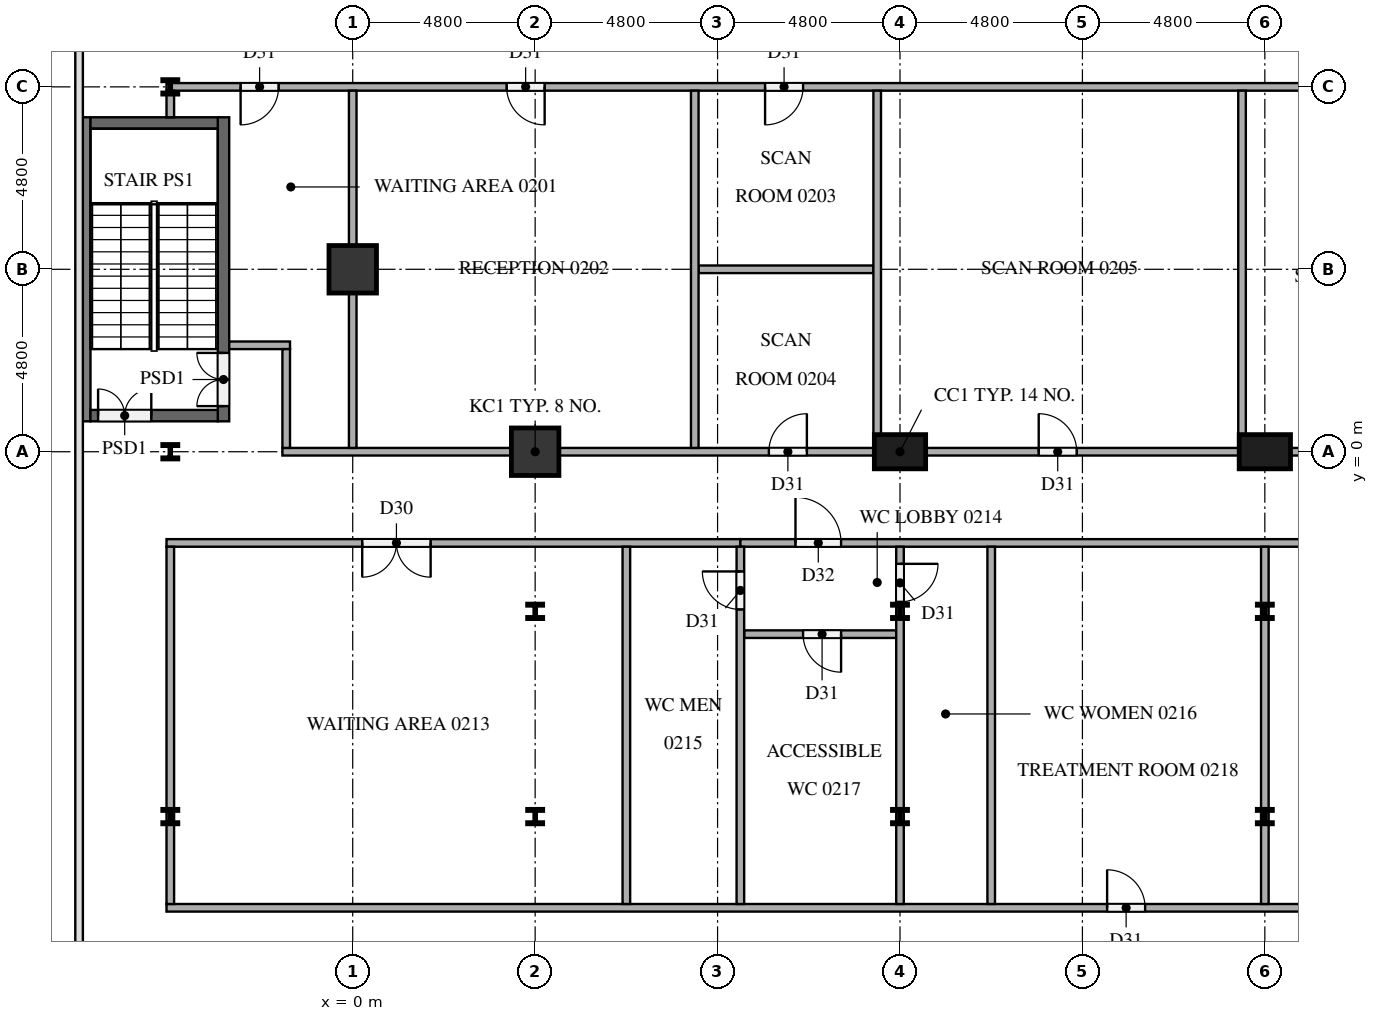
"""IFC4 building model, lengths in metres.
Left out: names, types, materials, properties, quantities, classifications, styles, units other than length and angle.
Written with IfcOpenShell. Run it as: python <this file> out.ifc"""

import sys

from ifc_helpers import new_model, si_unit, direction, frame, frame_2d, origin, origin_2d, place, context, subcontext, project, spatial, rectangle, i_section, extrude, element, fill, save


model = new_model("IFC4")
c1 = context("Model", 3, precision=1e-05, world=origin(), true_north=direction((0.0, 1.0)))
c2 = subcontext(c1, "Body", "Model", "MODEL_VIEW")
j1 = project(units=[si_unit("LENGTHUNIT", "METRE"), si_unit("PLANEANGLEUNIT", "RADIAN")], contexts=[c1])
p1 = place(None, origin())
s1 = spatial("IfcSite", under=j1, at=p1, CompositionType="ELEMENT")
p2 = place(p1, origin())
s2 = spatial("IfcBuilding", under=s1, at=p2, CompositionType="ELEMENT")
p3 = place(p2, frame((0.0, 0.0, 10.5)))
s3 = spatial("IfcBuildingStorey", under=s2, at=p3, CompositionType="ELEMENT", Elevation=10.5)
p4 = place(p3, frame((-7.05, 0.8, 0.0), z_axis=(0.0, 0.0, 1.0), x_axis=(0.0, 1.0, 0.0)))
e1 = element("IfcWall", 1, at=p4, inside=s3, PredefinedType="SOLIDWALL", context=c2, shape_type="SweptSolid", body=[
    extrude(rectangle(XDim=8.0, YDim=0.3, at=frame_2d((4.0, 0.0))), origin(), (0.0, 0.0, 1.0), 4.2),
])
p5 = place(p3, frame((-3.4, 0.8, 0.0), z_axis=(0.0, 0.0, 1.0), x_axis=(0.0, 1.0, 0.0)))
e2 = element("IfcWall", 2, at=p5, inside=s3, PredefinedType="SOLIDWALL", context=c2, shape_type="SweptSolid", body=[
    extrude(rectangle(XDim=8.0, YDim=0.3, at=frame_2d((4.0, 0.0))), origin(), (0.0, 0.0, 1.0), 4.2),
])
p6 = place(p5, frame((0.4, 0.0, 0.0)))
e3 = element("IfcOpeningElement", 3, at=p6, cuts=e2, PredefinedType="OPENING", context=c2, shape_type="SweptSolid", body=[
    extrude(rectangle(XDim=1.4, YDim=2.1, at=frame_2d((0.7, 1.05))), frame((0.0, 0.16, 0.0), z_axis=(0.0, -1.0, 0.0), x_axis=(1.0, 0.0, 0.0)), (0.0, 0.0, 1.0), 0.32),
])
p7 = place(p3, frame((-6.9, 0.95, 0.0), z_axis=(0.0, 0.0, 1.0), x_axis=(1.0, 0.0, 0.0)))
e4 = element("IfcWall", 4, at=p7, inside=s3, PredefinedType="SOLIDWALL", context=c2, shape_type="SweptSolid", body=[
    extrude(rectangle(XDim=3.35, YDim=0.3, at=frame_2d((1.675, 0.0))), origin(), (0.0, 0.0, 1.0), 4.2),
])
p8 = place(p7, frame((0.2, 0.0, 0.0)))
e5 = element("IfcOpeningElement", 5, at=p8, cuts=e4, PredefinedType="OPENING", context=c2, shape_type="SweptSolid", body=[
    extrude(rectangle(XDim=1.4, YDim=2.1, at=frame_2d((0.7, 1.05))), frame((0.0, 0.16, 0.0), z_axis=(0.0, -1.0, 0.0), x_axis=(1.0, 0.0, 0.0)), (0.0, 0.0, 1.0), 0.32),
])
p9 = place(p3, frame((-6.9, 8.65, 0.0), z_axis=(0.0, 0.0, 1.0), x_axis=(1.0, 0.0, 0.0)))
e6 = element("IfcWall", 6, at=p9, inside=s3, PredefinedType="SOLIDWALL", context=c2, shape_type="SweptSolid", body=[
    extrude(rectangle(XDim=3.35, YDim=0.3, at=frame_2d((1.675, 0.0))), origin(), (0.0, 0.0, 1.0), 4.2),
])
p10 = place(p3, frame((4.8, 0.0, 0.0), z_axis=(0.0, 0.0, 1.0), x_axis=(1.0, 0.0, 0.0)))
e7 = element("IfcColumn", 7, at=p10, inside=s3, PredefinedType="COLUMN", context=c2, shape_type="SweptSolid", body=[
    extrude(rectangle(XDim=1.25, YDim=1.25, at=origin_2d()), origin(), (0.0, 0.0, 1.0), 4.2),
])
for number, where, z_axis, x_axis in (
    (8, (14.4, 0.0, 0.0), (0.0, 0.0, 1.0), (1.0, 0.0, 0.0)),
    (9, (24.0, 0.0, 0.0), (0.0, 0.0, 1.0), (1.0, 0.0, 0.0)),
):
    element("IfcColumn", number, at=place(p3, frame(where, z_axis=z_axis, x_axis=x_axis)), inside=s3, PredefinedType="COLUMN", context=c2, shape_type="SweptSolid", body=[
        extrude(rectangle(XDim=1.35, YDim=0.9, at=origin_2d()), origin(), (0.0, 0.0, 1.0), 4.2),
    ])
p11 = place(p3, frame((0.0, 4.8, 0.0), z_axis=(0.0, 0.0, 1.0), x_axis=(1.0, 0.0, 0.0)))
e10 = element("IfcColumn", 10, at=p11, inside=s3, PredefinedType="COLUMN", context=c2, shape_type="SweptSolid", body=[
    extrude(rectangle(XDim=1.25, YDim=1.25, at=origin_2d()), origin(), (0.0, 0.0, 1.0), 4.2),
])
for number, where, z_axis, x_axis in (
    (11, (-4.8, -9.6, 0.0), (0.0, 0.0, 1.0), (1.0, 0.0, 0.0)),
    (12, (-4.8, 0.0, 0.0), (0.0, 0.0, 1.0), (1.0, 0.0, 0.0)),
    (13, (-4.8, 9.6, 0.0), (0.0, 0.0, 1.0), (1.0, 0.0, 0.0)),
    (14, (4.8, -9.6, 0.0), (0.0, 0.0, 1.0), (1.0, 0.0, 0.0)),
    (15, (4.8, -4.2, 0.0), (0.0, 0.0, 1.0), (1.0, 0.0, 0.0)),
    (16, (14.4, -9.6, 0.0), (0.0, 0.0, 1.0), (1.0, 0.0, 0.0)),
    (17, (14.4, -4.2, 0.0), (0.0, 0.0, 1.0), (1.0, 0.0, 0.0)),
    (18, (24.0, -9.6, 0.0), (0.0, 0.0, 1.0), (1.0, 0.0, 0.0)),
    (19, (24.0, -4.2, 0.0), (0.0, 0.0, 1.0), (1.0, 0.0, 0.0)),
):
    element("IfcColumn", number, at=place(p3, frame(where, z_axis=z_axis, x_axis=x_axis)), inside=s3, PredefinedType="COLUMN", context=c2, shape_type="SweptSolid", body=[
        extrude(i_section(OverallWidth=0.396, OverallDepth=0.381, WebThickness=0.019, FlangeThickness=0.03, at=origin_2d()), origin(), (0.0, 0.0, 1.0), 4.2),
    ])
p12 = place(p3, frame((-4.9, -12.0, 0.0), z_axis=(0.0, 0.0, 1.0), x_axis=(1.0, 0.0, 0.0)))
e20 = element("IfcWall", 20, at=p12, inside=s3, PredefinedType="PARTITIONING", context=c2, shape_type="SweptSolid", body=[
    extrude(rectangle(XDim=34.4, YDim=0.2, at=frame_2d((17.2, 0.0))), origin(), (0.0, 0.0, 1.0), 4.2),
])
p13 = place(p12, frame((24.75, 0.0, 0.0)))
e21 = element("IfcOpeningElement", 21, at=p13, cuts=e20, PredefinedType="OPENING", context=c2, shape_type="SweptSolid", body=[
    extrude(rectangle(XDim=1.0, YDim=2.1, at=frame_2d((0.5, 1.05))), frame((0.0, 0.11, 0.0), z_axis=(0.0, -1.0, 0.0), x_axis=(1.0, 0.0, 0.0)), (0.0, 0.0, 1.0), 0.22),
])
p14 = place(p12, frame((31.15, 0.0, 0.0)))
e22 = element("IfcOpeningElement", 22, at=p14, cuts=e20, PredefinedType="OPENING", context=c2, shape_type="SweptSolid", body=[
    extrude(rectangle(XDim=1.0, YDim=2.1, at=frame_2d((0.5, 1.05))), frame((0.0, 0.11, 0.0), z_axis=(0.0, -1.0, 0.0), x_axis=(1.0, 0.0, 0.0)), (0.0, 0.0, 1.0), 0.22),
])
p15 = place(p3, frame((14.3, -4.8, 0.0), z_axis=(0.0, 0.0, 1.0), x_axis=(-1.0, 0.0, 0.0)))
e23 = element("IfcWall", 23, at=p15, inside=s3, PredefinedType="PARTITIONING", context=c2, shape_type="SweptSolid", body=[
    extrude(rectangle(XDim=4.0, YDim=0.2, at=frame_2d((2.0, 0.0))), origin(), (0.0, 0.0, 1.0), 4.2),
])
p16 = place(p15, frame((1.45, 0.0, 0.0)))
e24 = element("IfcOpeningElement", 24, at=p16, cuts=e23, PredefinedType="OPENING", context=c2, shape_type="SweptSolid", body=[
    extrude(rectangle(XDim=1.0, YDim=2.1, at=frame_2d((0.5, 1.05))), frame((0.0, 0.11, 0.0), z_axis=(0.0, -1.0, 0.0), x_axis=(1.0, 0.0, 0.0)), (0.0, 0.0, 1.0), 0.22),
])
p17 = place(p3, frame((10.2, -2.4, 0.0), z_axis=(0.0, 0.0, 1.0), x_axis=(-1.0, 0.0, 0.0)))
e25 = element("IfcWall", 25, at=p17, inside=s3, PredefinedType="PARTITIONING", context=c2, shape_type="SweptSolid", body=[
    extrude(rectangle(XDim=15.1, YDim=0.2, at=frame_2d((7.55, 0.0))), origin(), (0.0, 0.0, 1.0), 4.2),
])
p18 = place(p17, frame((8.15, 0.0, 0.0)))
e26 = element("IfcOpeningElement", 26, at=p18, cuts=e25, PredefinedType="OPENING", context=c2, shape_type="SweptSolid", body=[
    extrude(rectangle(XDim=1.8, YDim=2.1, at=frame_2d((0.9, 1.05))), frame((0.0, 0.11, 0.0), z_axis=(0.0, -1.0, 0.0), x_axis=(1.0, 0.0, 0.0)), (0.0, 0.0, 1.0), 0.22),
])
p19 = place(p3, frame((10.2, -2.4, 0.0), z_axis=(0.0, 0.0, 1.0), x_axis=(1.0, 0.0, 0.0)))
e27 = element("IfcWall", 27, at=p19, inside=s3, PredefinedType="PARTITIONING", context=c2, shape_type="SweptSolid", body=[
    extrude(rectangle(XDim=19.3, YDim=0.2, at=frame_2d((9.65, 0.0))), origin(), (0.0, 0.0, 1.0), 4.2),
])
p20 = place(p19, frame((1.45, 0.0, 0.0)))
e28 = element("IfcOpeningElement", 28, at=p20, cuts=e27, PredefinedType="OPENING", context=c2, shape_type="SweptSolid", body=[
    extrude(rectangle(XDim=1.2, YDim=2.1, at=frame_2d((0.6, 1.05))), frame((0.0, 0.11, 0.0), z_axis=(0.0, -1.0, 0.0), x_axis=(1.0, 0.0, 0.0)), (0.0, 0.0, 1.0), 0.22),
])
p21 = place(p3, frame((-1.85, 0.0, 0.0), z_axis=(0.0, 0.0, 1.0), x_axis=(1.0, 0.0, 0.0)))
e29 = element("IfcWall", 29, at=p21, inside=s3, PredefinedType="PARTITIONING", context=c2, shape_type="SweptSolid", body=[
    extrude(rectangle(XDim=31.35, YDim=0.2, at=frame_2d((15.675, 0.0))), origin(), (0.0, 0.0, 1.0), 4.2),
])
p22 = place(p21, frame((12.8, 0.0, 0.0)))
e30 = element("IfcOpeningElement", 30, at=p22, cuts=e29, PredefinedType="OPENING", context=c2, shape_type="SweptSolid", body=[
    extrude(rectangle(XDim=1.0, YDim=2.1, at=frame_2d((0.5, 1.05))), frame((0.0, 0.11, 0.0), z_axis=(0.0, -1.0, 0.0), x_axis=(1.0, 0.0, 0.0)), (0.0, 0.0, 1.0), 0.22),
])
p23 = place(p21, frame((19.9, 0.0, 0.0)))
e31 = element("IfcOpeningElement", 31, at=p23, cuts=e29, PredefinedType="OPENING", context=c2, shape_type="SweptSolid", body=[
    extrude(rectangle(XDim=1.0, YDim=2.1, at=frame_2d((0.5, 1.05))), frame((0.0, 0.11, 0.0), z_axis=(0.0, -1.0, 0.0), x_axis=(1.0, 0.0, 0.0)), (0.0, 0.0, 1.0), 0.22),
])
p24 = place(p21, frame((27.8, 0.0, 0.0)))
e32 = element("IfcOpeningElement", 32, at=p24, cuts=e29, PredefinedType="OPENING", context=c2, shape_type="SweptSolid", body=[
    extrude(rectangle(XDim=1.0, YDim=2.1, at=frame_2d((0.5, 1.05))), frame((0.0, 0.11, 0.0), z_axis=(0.0, -1.0, 0.0), x_axis=(1.0, 0.0, 0.0)), (0.0, 0.0, 1.0), 0.22),
])
p25 = place(p3, frame((-3.25, 2.8, 0.0), z_axis=(0.0, 0.0, 1.0), x_axis=(1.0, 0.0, 0.0)))
e33 = element("IfcWall", 33, at=p25, inside=s3, PredefinedType="PARTITIONING", context=c2, shape_type="SweptSolid", body=[
    extrude(rectangle(XDim=1.6, YDim=0.2, at=frame_2d((0.8, 0.0))), origin(), (0.0, 0.0, 1.0), 4.2),
])
p26 = place(p3, frame((9.1, 4.8, 0.0), z_axis=(0.0, 0.0, 1.0), x_axis=(1.0, 0.0, 0.0)))
e34 = element("IfcWall", 34, at=p26, inside=s3, PredefinedType="PARTITIONING", context=c2, shape_type="SweptSolid", body=[
    extrude(rectangle(XDim=4.6, YDim=0.2, at=frame_2d((2.3, 0.0))), origin(), (0.0, 0.0, 1.0), 4.2),
])
p27 = place(p3, frame((29.5, 9.6, 0.0), z_axis=(0.0, 0.0, 1.0), x_axis=(-1.0, 0.0, 0.0)))
e35 = element("IfcWall", 35, at=p27, inside=s3, PredefinedType="PARTITIONING", context=c2, shape_type="SweptSolid", body=[
    extrude(rectangle(XDim=34.4, YDim=0.2, at=frame_2d((17.2, 0.0))), origin(), (0.0, 0.0, 1.0), 4.2),
])
p28 = place(p27, frame((31.45, 0.0, 0.0)))
e36 = element("IfcOpeningElement", 36, at=p28, cuts=e35, PredefinedType="OPENING", context=c2, shape_type="SweptSolid", body=[
    extrude(rectangle(XDim=1.0, YDim=2.1, at=frame_2d((0.5, 1.05))), frame((0.0, 0.11, 0.0), z_axis=(0.0, -1.0, 0.0), x_axis=(1.0, 0.0, 0.0)), (0.0, 0.0, 1.0), 0.22),
])
p29 = place(p27, frame((24.45, 0.0, 0.0)))
e37 = element("IfcOpeningElement", 37, at=p29, cuts=e35, PredefinedType="OPENING", context=c2, shape_type="SweptSolid", body=[
    extrude(rectangle(XDim=1.0, YDim=2.1, at=frame_2d((0.5, 1.05))), frame((0.0, 0.11, 0.0), z_axis=(0.0, -1.0, 0.0), x_axis=(1.0, 0.0, 0.0)), (0.0, 0.0, 1.0), 0.22),
])
p30 = place(p27, frame((17.65, 0.0, 0.0)))
e38 = element("IfcOpeningElement", 38, at=p30, cuts=e35, PredefinedType="OPENING", context=c2, shape_type="SweptSolid", body=[
    extrude(rectangle(XDim=1.0, YDim=2.1, at=frame_2d((0.5, 1.05))), frame((0.0, 0.11, 0.0), z_axis=(0.0, -1.0, 0.0), x_axis=(1.0, 0.0, 0.0)), (0.0, 0.0, 1.0), 0.22),
])
p31 = place(p3, frame((-4.8, -11.9, 0.0), z_axis=(0.0, 0.0, 1.0), x_axis=(0.0, 1.0, 0.0)))
e39 = element("IfcWall", 39, at=p31, inside=s3, PredefinedType="PARTITIONING", context=c2, shape_type="SweptSolid", body=[
    extrude(rectangle(XDim=9.4, YDim=0.2, at=frame_2d((4.7, 0.0))), origin(), (0.0, 0.0, 1.0), 4.2),
])
p32 = place(p3, frame((-4.8, 8.8, 0.0), z_axis=(0.0, 0.0, 1.0), x_axis=(0.0, 1.0, 0.0)))
e40 = element("IfcWall", 40, at=p32, inside=s3, PredefinedType="PARTITIONING", context=c2, shape_type="SweptSolid", body=[
    extrude(rectangle(XDim=0.7, YDim=0.2, at=frame_2d((0.35, 0.0))), origin(), (0.0, 0.0, 1.0), 4.2),
])
p33 = place(p3, frame((-1.75, 0.1, 0.0), z_axis=(0.0, 0.0, 1.0), x_axis=(0.0, 1.0, 0.0)))
e41 = element("IfcWall", 41, at=p33, inside=s3, PredefinedType="PARTITIONING", context=c2, shape_type="SweptSolid", body=[
    extrude(rectangle(XDim=2.6, YDim=0.2, at=frame_2d((1.3, 0.0))), origin(), (0.0, 0.0, 1.0), 4.2),
])
for number, where, z_axis, x_axis in (
    (42, (0.0, 0.1, 0.0), (0.0, 0.0, 1.0), (0.0, 1.0, 0.0)),
    (43, (7.2, -11.9, 0.0), (0.0, 0.0, 1.0), (0.0, 1.0, 0.0)),
    (44, (9.0, 0.1, 0.0), (0.0, 0.0, 1.0), (0.0, 1.0, 0.0)),
):
    element("IfcWall", number, at=place(p3, frame(where, z_axis=z_axis, x_axis=x_axis)), inside=s3, PredefinedType="PARTITIONING", context=c2, shape_type="SweptSolid", body=[
        extrude(rectangle(XDim=9.4, YDim=0.2, at=frame_2d((4.7, 0.0))), origin(), (0.0, 0.0, 1.0), 4.2),
    ])
p34 = place(p3, frame((10.2, -11.9, 0.0), z_axis=(0.0, 0.0, 1.0), x_axis=(0.0, 1.0, 0.0)))
e45 = element("IfcWall", 45, at=p34, inside=s3, PredefinedType="PARTITIONING", context=c2, shape_type="SweptSolid", body=[
    extrude(rectangle(XDim=9.4, YDim=0.2, at=frame_2d((4.7, 0.0))), origin(), (0.0, 0.0, 1.0), 4.2),
])
p35 = place(p34, frame((7.75, 0.0, 0.0)))
e46 = element("IfcOpeningElement", 46, at=p35, cuts=e45, PredefinedType="OPENING", context=c2, shape_type="SweptSolid", body=[
    extrude(rectangle(XDim=1.0, YDim=2.1, at=frame_2d((0.5, 1.05))), frame((0.0, 0.11, 0.0), z_axis=(0.0, -1.0, 0.0), x_axis=(1.0, 0.0, 0.0)), (0.0, 0.0, 1.0), 0.22),
])
p36 = place(p3, frame((13.8, 0.1, 0.0), z_axis=(0.0, 0.0, 1.0), x_axis=(0.0, 1.0, 0.0)))
e47 = element("IfcWall", 47, at=p36, inside=s3, PredefinedType="PARTITIONING", context=c2, shape_type="SweptSolid", body=[
    extrude(rectangle(XDim=9.4, YDim=0.2, at=frame_2d((4.7, 0.0))), origin(), (0.0, 0.0, 1.0), 4.2),
])
p37 = place(p3, frame((14.4, -2.5, 0.0), z_axis=(0.0, 0.0, 1.0), x_axis=(0.0, -1.0, 0.0)))
e48 = element("IfcWall", 48, at=p37, inside=s3, PredefinedType="PARTITIONING", context=c2, shape_type="SweptSolid", body=[
    extrude(rectangle(XDim=9.4, YDim=0.2, at=frame_2d((4.7, 0.0))), origin(), (0.0, 0.0, 1.0), 4.2),
])
p38 = place(p37, frame((0.45, 0.0, 0.0)))
e49 = element("IfcOpeningElement", 49, at=p38, cuts=e48, PredefinedType="OPENING", context=c2, shape_type="SweptSolid", body=[
    extrude(rectangle(XDim=1.0, YDim=2.1, at=frame_2d((0.5, 1.05))), frame((0.0, 0.11, 0.0), z_axis=(0.0, -1.0, 0.0), x_axis=(1.0, 0.0, 0.0)), (0.0, 0.0, 1.0), 0.22),
])
for number, where, z_axis, x_axis in (
    (50, (16.8, -11.9, 0.0), (0.0, 0.0, 1.0), (0.0, 1.0, 0.0)),
    (51, (23.4, 0.1, 0.0), (0.0, 0.0, 1.0), (0.0, 1.0, 0.0)),
    (52, (24.0, -11.9, 0.0), (0.0, 0.0, 1.0), (0.0, 1.0, 0.0)),
):
    element("IfcWall", number, at=place(p3, frame(where, z_axis=z_axis, x_axis=x_axis)), inside=s3, PredefinedType="PARTITIONING", context=c2, shape_type="SweptSolid", body=[
        extrude(rectangle(XDim=9.4, YDim=0.2, at=frame_2d((4.7, 0.0))), origin(), (0.0, 0.0, 1.0), 4.2),
    ])
p39 = place(p6, origin())
e53 = element("IfcDoor", 53, at=p39, inside=s3, OperationType="DOUBLE_DOOR_SINGLE_SWING", PredefinedType="DOOR", context=c2, shape_type="SweptSolid", body=[
    extrude(rectangle(XDim=1.4, YDim=2.1, at=frame_2d((0.7, 1.05))), frame((0.0, 0.025, 0.0), z_axis=(0.0, -1.0, 0.0), x_axis=(1.0, 0.0, 0.0)), (0.0, 0.0, 1.0), 0.05),
])
fill(e3, e53)
p40 = place(p8, origin())
e54 = element("IfcDoor", 54, at=p40, inside=s3, OperationType="DOUBLE_DOOR_SINGLE_SWING", PredefinedType="DOOR", context=c2, shape_type="SweptSolid", body=[
    extrude(rectangle(XDim=1.4, YDim=2.1, at=frame_2d((0.7, 1.05))), frame((0.0, 0.025, 0.0), z_axis=(0.0, -1.0, 0.0), x_axis=(1.0, 0.0, 0.0)), (0.0, 0.0, 1.0), 0.05),
])
fill(e5, e54)
p41 = place(p28, origin())
e55 = element("IfcDoor", 55, at=p41, inside=s3, OperationType="SINGLE_SWING_RIGHT", PredefinedType="DOOR", context=c2, shape_type="SweptSolid", body=[
    extrude(rectangle(XDim=1.0, YDim=2.1, at=frame_2d((0.5, 1.05))), frame((0.0, 0.025, 0.0), z_axis=(0.0, -1.0, 0.0), x_axis=(1.0, 0.0, 0.0)), (0.0, 0.0, 1.0), 0.05),
])
fill(e36, e55)
p42 = place(p29, origin())
e56 = element("IfcDoor", 56, at=p42, inside=s3, OperationType="SINGLE_SWING_LEFT", PredefinedType="DOOR", context=c2, shape_type="SweptSolid", body=[
    extrude(rectangle(XDim=1.0, YDim=2.1, at=frame_2d((0.5, 1.05))), frame((0.0, 0.025, 0.0), z_axis=(0.0, -1.0, 0.0), x_axis=(1.0, 0.0, 0.0)), (0.0, 0.0, 1.0), 0.05),
])
fill(e37, e56)
p43 = place(p30, origin())
e57 = element("IfcDoor", 57, at=p43, inside=s3, OperationType="SINGLE_SWING_RIGHT", PredefinedType="DOOR", context=c2, shape_type="SweptSolid", body=[
    extrude(rectangle(XDim=1.0, YDim=2.1, at=frame_2d((0.5, 1.05))), frame((0.0, 0.025, 0.0), z_axis=(0.0, -1.0, 0.0), x_axis=(1.0, 0.0, 0.0)), (0.0, 0.0, 1.0), 0.05),
])
fill(e38, e57)
p44 = place(p22, origin())
e58 = element("IfcDoor", 58, at=p44, inside=s3, OperationType="SINGLE_SWING_RIGHT", PredefinedType="DOOR", context=c2, shape_type="SweptSolid", body=[
    extrude(rectangle(XDim=1.0, YDim=2.1, at=frame_2d((0.5, 1.05))), frame((0.0, 0.025, 0.0), z_axis=(0.0, -1.0, 0.0), x_axis=(1.0, 0.0, 0.0)), (0.0, 0.0, 1.0), 0.05),
])
fill(e30, e58)
p45 = place(p23, origin())
e59 = element("IfcDoor", 59, at=p45, inside=s3, OperationType="SINGLE_SWING_LEFT", PredefinedType="DOOR", context=c2, shape_type="SweptSolid", body=[
    extrude(rectangle(XDim=1.0, YDim=2.1, at=frame_2d((0.5, 1.05))), frame((0.0, 0.025, 0.0), z_axis=(0.0, -1.0, 0.0), x_axis=(1.0, 0.0, 0.0)), (0.0, 0.0, 1.0), 0.05),
])
fill(e31, e59)
p46 = place(p18, origin())
e60 = element("IfcDoor", 60, at=p46, inside=s3, OperationType="DOUBLE_DOOR_SINGLE_SWING", PredefinedType="DOOR", context=c2, shape_type="SweptSolid", body=[
    extrude(rectangle(XDim=1.8, YDim=2.1, at=frame_2d((0.9, 1.05))), frame((0.0, 0.025, 0.0), z_axis=(0.0, -1.0, 0.0), x_axis=(1.0, 0.0, 0.0)), (0.0, 0.0, 1.0), 0.05),
])
fill(e26, e60)
p47 = place(p20, origin())
e61 = element("IfcDoor", 61, at=p47, inside=s3, OperationType="SINGLE_SWING_LEFT", PredefinedType="DOOR", context=c2, shape_type="SweptSolid", body=[
    extrude(rectangle(XDim=1.2, YDim=2.1, at=frame_2d((0.6, 1.05))), frame((0.0, 0.025, 0.0), z_axis=(0.0, -1.0, 0.0), x_axis=(1.0, 0.0, 0.0)), (0.0, 0.0, 1.0), 0.05),
])
fill(e28, e61)
p48 = place(p35, origin())
e62 = element("IfcDoor", 62, at=p48, inside=s3, OperationType="SINGLE_SWING_RIGHT", PredefinedType="DOOR", context=c2, shape_type="SweptSolid", body=[
    extrude(rectangle(XDim=1.0, YDim=2.1, at=frame_2d((0.5, 1.05))), frame((0.0, 0.025, 0.0), z_axis=(0.0, -1.0, 0.0), x_axis=(1.0, 0.0, 0.0)), (0.0, 0.0, 1.0), 0.05),
])
fill(e46, e62)
p49 = place(p38, origin())
e63 = element("IfcDoor", 63, at=p49, inside=s3, OperationType="SINGLE_SWING_LEFT", PredefinedType="DOOR", context=c2, shape_type="SweptSolid", body=[
    extrude(rectangle(XDim=1.0, YDim=2.1, at=frame_2d((0.5, 1.05))), frame((0.0, 0.025, 0.0), z_axis=(0.0, -1.0, 0.0), x_axis=(1.0, 0.0, 0.0)), (0.0, 0.0, 1.0), 0.05),
])
fill(e49, e63)
p50 = place(p16, origin())
e64 = element("IfcDoor", 64, at=p50, inside=s3, OperationType="SINGLE_SWING_LEFT", PredefinedType="DOOR", context=c2, shape_type="SweptSolid", body=[
    extrude(rectangle(XDim=1.0, YDim=2.1, at=frame_2d((0.5, 1.05))), frame((0.0, 0.025, 0.0), z_axis=(0.0, -1.0, 0.0), x_axis=(1.0, 0.0, 0.0)), (0.0, 0.0, 1.0), 0.05),
])
fill(e24, e64)
p51 = place(p13, origin())
e65 = element("IfcDoor", 65, at=p51, inside=s3, OperationType="SINGLE_SWING_LEFT", PredefinedType="DOOR", context=c2, shape_type="SweptSolid", body=[
    extrude(rectangle(XDim=1.0, YDim=2.1, at=frame_2d((0.5, 1.05))), frame((0.0, 0.025, 0.0), z_axis=(0.0, -1.0, 0.0), x_axis=(1.0, 0.0, 0.0)), (0.0, 0.0, 1.0), 0.05),
])
fill(e21, e65)
save(model, sys.argv[1])
